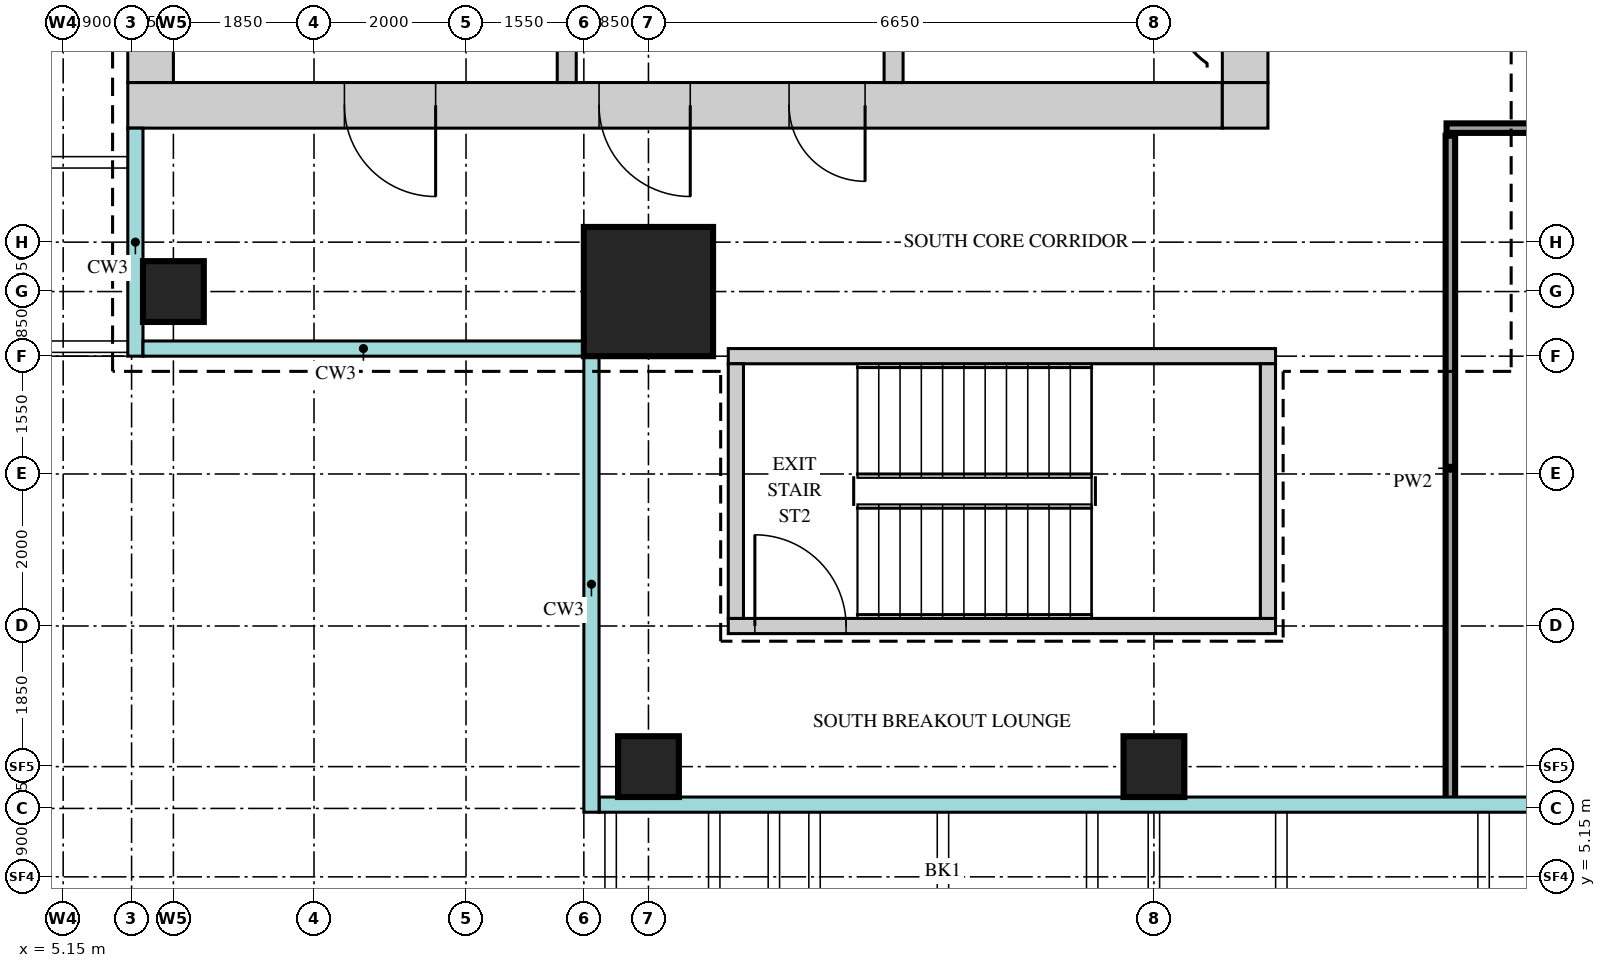
"""IFC4 building model, lengths in metres.
Left out: names, types, materials, properties, quantities, classifications, styles, units other than length and angle.
Written with IfcOpenShell. Run it as: python <this file> out.ifc"""

import sys

from ifc_helpers import new_model, si_unit, direction, frame, frame_2d, origin, origin_2d, place, context, subcontext, project, spatial, rectangle, extrude, source, transform, mapped, element, fill, save


model = new_model("IFC4")
c1 = context("Model", 3, precision=1e-05, world=origin(), true_north=direction((0.0, 1.0)))
c2 = subcontext(c1, "Body", "Model", "MODEL_VIEW")
j1 = project(units=[si_unit("LENGTHUNIT", "METRE"), si_unit("PLANEANGLEUNIT", "RADIAN")], contexts=[c1])
p1 = place(None, origin())
s1 = spatial("IfcSite", under=j1, at=p1, CompositionType="ELEMENT")
p2 = place(p1, origin())
s2 = spatial("IfcBuilding", under=s1, at=p2, CompositionType="ELEMENT")
p3 = place(p2, frame((0.0, 0.0, 294.2)))
s3 = spatial("IfcBuildingStorey", under=s2, at=p3, CompositionType="ELEMENT", Elevation=294.2)
m1 = source(origin(), c2, "Body", "SweptSolid", [
    extrude(rectangle(XDim=14.4, YDim=0.6, at=frame_2d((7.2, 0.0))), origin(), (0.0, 0.0, 1.0), 3.75),
])
p4 = place(p3, frame((6.0, 15.3, 0.0), z_axis=(0.0, 0.0, 1.0), x_axis=(1.0, 0.0, 0.0)))
e1 = element("IfcWall", 1, at=p4, inside=s3, PredefinedType="SHEAR", context=c2, shape_type="MappedRepresentation", body=[
    mapped(m1, transform((0.0, 0.0, 0.0))),
])
m2 = source(origin(), c2, "Body", "SweptSolid", [
    extrude(rectangle(XDim=1.2, YDim=2.1, at=frame_2d((0.6, 1.05))), frame((0.0, 0.31, 0.0), z_axis=(0.0, -1.0, 0.0), x_axis=(1.0, 0.0, 0.0)), (0.0, 0.0, 1.0), 0.62),
])
p5 = place(p4, frame((6.2, 0.0, 0.0)))
e2 = element("IfcOpeningElement", 2, at=p5, cuts=e1, PredefinedType="OPENING", context=c2, shape_type="MappedRepresentation", body=[
    mapped(m2, transform((0.0, 0.0, 0.0))),
])
p6 = place(p4, frame((2.85, 0.0, 0.0)))
e3 = element("IfcOpeningElement", 3, at=p6, cuts=e1, PredefinedType="OPENING", context=c2, shape_type="MappedRepresentation", body=[
    mapped(m2, transform((0.0, 0.0, 0.0))),
])
m3 = source(origin(), c2, "Body", "SweptSolid", [
    extrude(rectangle(XDim=1.0, YDim=2.1, at=frame_2d((0.5, 1.05))), frame((0.0, 0.31, 0.0), z_axis=(0.0, -1.0, 0.0), x_axis=(1.0, 0.0, 0.0)), (0.0, 0.0, 1.0), 0.62),
])
p7 = place(p4, frame((8.7, 0.0, 0.0)))
e4 = element("IfcOpeningElement", 4, at=p7, cuts=e1, PredefinedType="OPENING", context=c2, shape_type="MappedRepresentation", body=[
    mapped(m3, transform((0.0, 0.0, 0.0))),
])
m4 = source(origin(), c2, "Body", "SweptSolid", [
    extrude(rectangle(XDim=0.6, YDim=0.6, at=frame_2d((0.3, 0.0))), origin(), (0.0, 0.0, 1.0), 3.75),
])
p8 = place(p3, frame((20.4, 15.3, 0.0), z_axis=(0.0, 0.0, 1.0), x_axis=(1.0, 0.0, 0.0)))
e5 = element("IfcWall", 5, at=p8, inside=s3, PredefinedType="SHEAR", context=c2, shape_type="MappedRepresentation", body=[
    mapped(m4, transform((0.0, 0.0, 0.0))),
])
m5 = source(origin(), c2, "Body", "SweptSolid", [
    extrude(rectangle(XDim=22.8, YDim=0.6, at=frame_2d((11.4, 0.0))), origin(), (0.0, 0.0, 1.0), 3.75),
])
p9 = place(p3, frame((20.7, 15.6, 0.0), z_axis=(0.0, 0.0, 1.0), x_axis=(0.0, 1.0, 0.0)))
e6 = element("IfcWall", 6, at=p9, inside=s3, PredefinedType="SHEAR", context=c2, shape_type="MappedRepresentation", body=[
    mapped(m5, transform((0.0, 0.0, 0.0))),
])
m6 = source(origin(), c2, "Body", "SweptSolid", [
    extrude(rectangle(XDim=1.8, YDim=2.1, at=frame_2d((0.9, 1.05))), frame((0.0, 0.31, 0.0), z_axis=(0.0, -1.0, 0.0), x_axis=(1.0, 0.0, 0.0)), (0.0, 0.0, 1.0), 0.62),
])
p10 = place(p9, frame((10.9, 0.0, 0.0)))
e7 = element("IfcOpeningElement", 7, at=p10, cuts=e6, PredefinedType="OPENING", context=c2, shape_type="MappedRepresentation", body=[
    mapped(m6, transform((0.0, 0.0, 0.0))),
])
m7 = source(origin(), c2, "Body", "SweptSolid", [
    extrude(rectangle(XDim=0.9, YDim=2.1, at=frame_2d((0.45, 1.05))), frame((0.0, 0.31, 0.0), z_axis=(0.0, -1.0, 0.0), x_axis=(1.0, 0.0, 0.0)), (0.0, 0.0, 1.0), 0.62),
])
p11 = place(p9, frame((0.55, 0.0, 0.0)))
e8 = element("IfcOpeningElement", 8, at=p11, cuts=e6, PredefinedType="OPENING", context=c2, shape_type="MappedRepresentation", body=[
    mapped(m7, transform((0.0, 0.0, 0.0))),
])
p12 = place(p9, frame((4.1, 0.0, 0.0)))
e9 = element("IfcOpeningElement", 9, at=p12, cuts=e6, PredefinedType="OPENING", context=c2, shape_type="MappedRepresentation", body=[
    mapped(m7, transform((0.0, 0.0, 0.0))),
])
p13 = place(p3, frame((6.3, 15.6, 0.0), z_axis=(0.0, 0.0, 1.0), x_axis=(0.0, 1.0, 0.0)))
e10 = element("IfcWall", 10, at=p13, inside=s3, PredefinedType="SHEAR", context=c2, shape_type="MappedRepresentation", body=[
    mapped(m5, transform((0.0, 0.0, 0.0))),
])
m8 = source(origin(), c2, "Body", "SweptSolid", [
    extrude(rectangle(XDim=7.2, YDim=0.2, at=frame_2d((3.6, 0.0))), origin(), (0.0, 0.0, 1.0), 3.75),
])
p14 = place(p3, frame((13.9, 12.0, 0.0), z_axis=(0.0, 0.0, 1.0), x_axis=(1.0, 0.0, 0.0)))
e11 = element("IfcWall", 11, at=p14, inside=s3, PredefinedType="SHEAR", context=c2, shape_type="MappedRepresentation", body=[
    mapped(m8, transform((0.0, 0.0, 0.0))),
])
p15 = place(p3, frame((13.9, 8.45, 0.0), z_axis=(0.0, 0.0, 1.0), x_axis=(1.0, 0.0, 0.0)))
e12 = element("IfcWall", 12, at=p15, inside=s3, PredefinedType="SHEAR", context=c2, shape_type="MappedRepresentation", body=[
    mapped(m8, transform((0.0, 0.0, 0.0))),
])
m9 = source(origin(), c2, "Body", "SweptSolid", [
    extrude(rectangle(XDim=1.2, YDim=2.1, at=frame_2d((0.6, 1.05))), frame((0.0, 0.11, 0.0), z_axis=(0.0, -1.0, 0.0), x_axis=(1.0, 0.0, 0.0)), (0.0, 0.0, 1.0), 0.22),
])
p16 = place(p15, frame((0.35, 0.0, 0.0)))
e13 = element("IfcOpeningElement", 13, at=p16, cuts=e12, PredefinedType="OPENING", context=c2, shape_type="MappedRepresentation", body=[
    mapped(m9, transform((0.0, 0.0, 0.0))),
])
m10 = source(origin(), c2, "Body", "SweptSolid", [
    extrude(rectangle(XDim=3.35, YDim=0.2, at=frame_2d((1.675, 0.0))), origin(), (0.0, 0.0, 1.0), 3.75),
])
for number, where, z_axis, x_axis in (
    (14, (21.0, 8.55, 0.0), (0.0, 0.0, 1.0), (0.0, 1.0, 0.0)),
    (15, (14.0, 8.55, 0.0), (0.0, 0.0, 1.0), (0.0, 1.0, 0.0)),
):
    element("IfcWall", number, at=place(p3, frame(where, z_axis=z_axis, x_axis=x_axis)), inside=s3, PredefinedType="SHEAR", context=c2, shape_type="MappedRepresentation", body=[
        mapped(m10, transform((0.0, 0.0, 0.0))),
    ])
m11 = source(origin(), c2, "Body", "SweptSolid", [
    extrude(rectangle(XDim=3.6, YDim=0.25, at=frame_2d((1.8, 0.0))), origin(), (0.0, 0.0, 1.0), 3.75),
])
for number, where, z_axis, x_axis in (
    (16, (16.075, 15.6, 0.0), (0.0, 0.0, 1.0), (0.0, 1.0, 0.0)),
    (17, (11.775, 15.6, 0.0), (0.0, 0.0, 1.0), (0.0, 1.0, 0.0)),
):
    element("IfcWall", number, at=place(p3, frame(where, z_axis=z_axis, x_axis=x_axis)), inside=s3, PredefinedType="STANDARD", context=c2, shape_type="MappedRepresentation", body=[
        mapped(m11, transform((0.0, 0.0, 0.0))),
    ])
m12 = source(origin(), c2, "Body", "SweptSolid", [
    extrude(rectangle(XDim=1.7, YDim=1.7, at=origin_2d()), origin(), (0.0, 0.0, 1.0), 3.75),
])
p17 = place(p3, frame((12.85, 12.85, 0.0), z_axis=(0.0, 0.0, 1.0), x_axis=(1.0, 0.0, 0.0)))
e18 = element("IfcColumn", 18, at=p17, inside=s3, PredefinedType="COLUMN", context=c2, shape_type="MappedRepresentation", body=[
    mapped(m12, transform((0.0, 0.0, 0.0))),
])
m13 = source(origin(), c2, "Body", "SweptSolid", [
    extrude(rectangle(XDim=0.8, YDim=0.8, at=origin_2d()), origin(), (0.0, 0.0, 1.0), 3.75),
])
for number, where, z_axis, x_axis in (
    (19, (12.85, 6.6, 0.0), (0.0, 0.0, 1.0), (1.0, 0.0, 0.0)),
    (20, (19.5, 6.6, 0.0), (0.0, 0.0, 1.0), (1.0, 0.0, 0.0)),
    (21, (6.6, 12.85, 0.0), (0.0, 0.0, 1.0), (1.0, 0.0, 0.0)),
):
    element("IfcColumn", number, at=place(p3, frame(where, z_axis=z_axis, x_axis=x_axis)), inside=s3, PredefinedType="COLUMN", context=c2, shape_type="MappedRepresentation", body=[
        mapped(m13, transform((0.0, 0.0, 0.0))),
    ])
m14 = source(origin(), c2, "Body", "SweptSolid", [
    extrude(rectangle(XDim=8.75, YDim=0.125, at=frame_2d((4.375, 0.0))), origin(), (0.0, 0.0, 1.0), 3.8),
])
p18 = place(p3, frame((23.4, 6.15, 0.0), z_axis=(0.0, 0.0, 1.0), x_axis=(0.0, 1.0, 0.0)))
e22 = element("IfcWall", 22, at=p18, inside=s3, PredefinedType="PARTITIONING", context=c2, shape_type="MappedRepresentation", body=[
    mapped(m14, transform((0.0, 0.0, 0.0))),
])
m15 = source(origin(), c2, "Body", "SweptSolid", [
    extrude(rectangle(XDim=19.1, YDim=0.125, at=frame_2d((9.55, 0.0))), origin(), (0.0, 0.0, 1.0), 3.8),
])
p19 = place(p3, frame((23.35, 15.0, 0.0), z_axis=(0.0, 0.0, 1.0), x_axis=(1.0, 0.0, 0.0)))
e23 = element("IfcWall", 23, at=p19, inside=s3, PredefinedType="PARTITIONING", context=c2, shape_type="MappedRepresentation", body=[
    mapped(m15, transform((0.0, 0.0, 0.0))),
])
m16 = source(origin(), c2, "Body", "SweptSolid", [
    extrude(rectangle(XDim=0.9, YDim=2.1, at=frame_2d((0.45, 1.05))), frame((0.0, 0.073, 0.0), z_axis=(0.0, -1.0, 0.0), x_axis=(1.0, 0.0, 0.0)), (0.0, 0.0, 1.0), 0.145),
])
p20 = place(p19, frame((5.3, 0.0, 0.0)))
e24 = element("IfcOpeningElement", 24, at=p20, cuts=e23, PredefinedType="OPENING", context=c2, shape_type="MappedRepresentation", body=[
    mapped(m16, transform((0.0, 0.0, 0.0))),
])
p21 = place(p19, frame((13.3, 0.0, 0.0)))
e25 = element("IfcOpeningElement", 25, at=p21, cuts=e23, PredefinedType="OPENING", context=c2, shape_type="MappedRepresentation", body=[
    mapped(m16, transform((0.0, 0.0, 0.0))),
])
p22 = place(p19, frame((17.95, 0.0, 0.0)))
e26 = element("IfcOpeningElement", 26, at=p22, cuts=e23, PredefinedType="OPENING", context=c2, shape_type="MappedRepresentation", body=[
    mapped(m16, transform((0.0, 0.0, 0.0))),
])
m17 = source(origin(), c2, "Body", "SweptSolid", [
    extrude(rectangle(XDim=1.2, YDim=2.1, at=frame_2d((0.6, 1.05))), frame((0.0, 0.25, 0.0), z_axis=(0.0, -1.0, 0.0), x_axis=(1.0, 0.0, 0.0)), (0.0, 0.0, 1.0), 0.5),
])
p23 = place(p5, origin())
e27 = element("IfcDoor", 27, at=p23, inside=s3, OperationType="SINGLE_SWING_RIGHT", PredefinedType="DOOR", context=c2, shape_type="MappedRepresentation", body=[
    mapped(m17, transform((0.0, 0.0, 0.0))),
])
fill(e2, e27)
p24 = place(p6, origin())
e28 = element("IfcDoor", 28, at=p24, inside=s3, OperationType="SINGLE_SWING_RIGHT", PredefinedType="DOOR", context=c2, shape_type="MappedRepresentation", body=[
    mapped(m17, transform((0.0, 0.0, 0.0))),
])
fill(e3, e28)
m18 = source(origin(), c2, "Body", "SweptSolid", [
    extrude(rectangle(XDim=1.0, YDim=2.1, at=frame_2d((0.5, 1.05))), frame((0.0, 0.25, 0.0), z_axis=(0.0, -1.0, 0.0), x_axis=(1.0, 0.0, 0.0)), (0.0, 0.0, 1.0), 0.5),
])
p25 = place(p7, origin())
e29 = element("IfcDoor", 29, at=p25, inside=s3, OperationType="SINGLE_SWING_RIGHT", PredefinedType="DOOR", context=c2, shape_type="MappedRepresentation", body=[
    mapped(m18, transform((0.0, 0.0, 0.0))),
])
fill(e4, e29)
m19 = source(origin(), c2, "Body", "SweptSolid", [
    extrude(rectangle(XDim=1.2, YDim=2.1, at=frame_2d((0.6, 1.05))), frame((0.0, 0.025, 0.0), z_axis=(0.0, -1.0, 0.0), x_axis=(1.0, 0.0, 0.0)), (0.0, 0.0, 1.0), 0.05),
])
p26 = place(p16, origin())
e30 = element("IfcDoor", 30, at=p26, inside=s3, OperationType="SINGLE_SWING_RIGHT", PredefinedType="DOOR", context=c2, shape_type="MappedRepresentation", body=[
    mapped(m19, transform((0.0, 0.0, 0.0))),
])
fill(e13, e30)
save(model, sys.argv[1])
